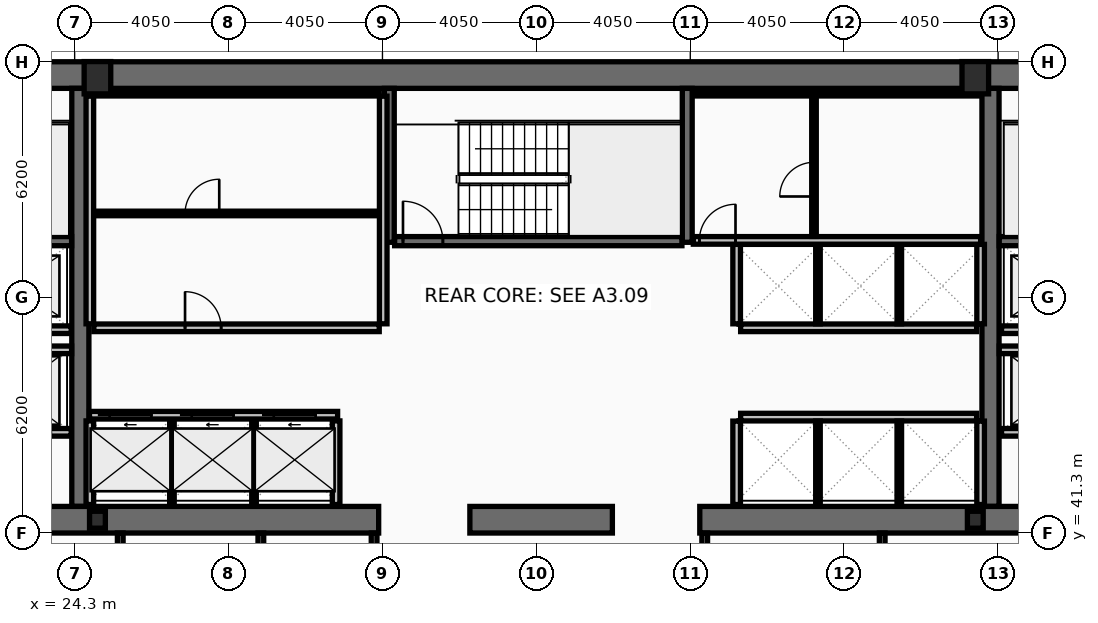
"""IFC4 building model, lengths in metres.
Left out: names, types, materials, properties, quantities, classifications, styles, units other than length and angle.
Written with IfcOpenShell. Run it as: python <this file> out.ifc"""

import sys

from ifc_helpers import new_model, si_unit, direction, frame, frame_2d, origin, origin_2d, place, context, subcontext, project, spatial, rectangle, hollow_rectangle, i_section, extrude, element, fill, save


model = new_model("IFC4")
c1 = context("Model", 3, precision=1e-05, world=origin(), true_north=direction((0.0, 1.0)))
c2 = subcontext(c1, "Body", "Model", "MODEL_VIEW")
j1 = project(units=[si_unit("LENGTHUNIT", "METRE"), si_unit("PLANEANGLEUNIT", "RADIAN")], contexts=[c1])
p1 = place(None, origin())
s1 = spatial("IfcSite", under=j1, at=p1, CompositionType="ELEMENT")
p2 = place(p1, origin())
s2 = spatial("IfcBuilding", under=s1, at=p2, CompositionType="ELEMENT")
p3 = place(p2, frame((0.0, 0.0, 118.2)))
s3 = spatial("IfcBuildingStorey", under=s2, at=p3, CompositionType="ELEMENT", Elevation=118.2)
p4 = place(p3, frame((16.2, 53.35, 0.0), z_axis=(0.0, 0.0, 1.0), x_axis=(1.0, 0.0, 0.0)))
e1 = element("IfcWall", 1, at=p4, inside=s3, PredefinedType="SHEAR", context=c2, shape_type="SweptSolid", body=[
    extrude(rectangle(XDim=40.5, YDim=0.7, at=frame_2d((20.25, 0.0))), origin(), (0.0, 0.0, 1.0), 3.44),
])
for number, where, z_axis, x_axis in (
    (2, (24.45, 42.0, 0.0), (0.0, 0.0, 1.0), (0.0, 1.0, 0.0)),
    (3, (48.4, 42.0, 0.0), (0.0, 0.0, 1.0), (0.0, 1.0, 0.0)),
):
    element("IfcWall", number, at=place(p3, frame(where, z_axis=z_axis, x_axis=x_axis)), inside=s3, PredefinedType="SHEAR", context=c2, shape_type="SweptSolid", body=[
        extrude(rectangle(XDim=11.0, YDim=0.45, at=frame_2d((5.5, 0.0))), origin(), (0.0, 0.0, 1.0), 3.44),
    ])
p5 = place(p3, frame((32.3, 41.65, 0.0), z_axis=(0.0, 0.0, 1.0), x_axis=(-1.0, 0.0, 0.0)))
e4 = element("IfcWall", 4, at=p5, inside=s3, PredefinedType="SHEAR", context=c2, shape_type="SweptSolid", body=[
    extrude(rectangle(XDim=11.45, YDim=0.7, at=frame_2d((5.725, 0.0))), origin(), (0.0, 0.0, 1.0), 3.44),
])
p6 = place(p3, frame((38.45, 41.65, 0.0), z_axis=(0.0, 0.0, 1.0), x_axis=(-1.0, 0.0, 0.0)))
e5 = element("IfcWall", 5, at=p6, inside=s3, PredefinedType="SHEAR", context=c2, shape_type="SweptSolid", body=[
    extrude(rectangle(XDim=3.75, YDim=0.7, at=frame_2d((1.875, 0.0))), origin(), (0.0, 0.0, 1.0), 3.44),
])
p7 = place(p3, frame((52.05, 41.65, 0.0), z_axis=(0.0, 0.0, 1.0), x_axis=(-1.0, 0.0, 0.0)))
e6 = element("IfcWall", 6, at=p7, inside=s3, PredefinedType="SHEAR", context=c2, shape_type="SweptSolid", body=[
    extrude(rectangle(XDim=11.3, YDim=0.7, at=frame_2d((5.65, 0.0))), origin(), (0.0, 0.0, 1.0), 3.44),
])
for number, where, z_axis, x_axis in (
    (7, (32.58, 48.95, 0.0), (0.0, 0.0, 1.0), (0.0, 1.0, 0.0)),
    (8, (40.42, 48.95, 0.0), (0.0, 0.0, 1.0), (0.0, 1.0, 0.0)),
):
    element("IfcWall", number, at=place(p3, frame(where, z_axis=z_axis, x_axis=x_axis)), inside=s3, PredefinedType="SHEAR", context=c2, shape_type="SweptSolid", body=[
        extrude(rectangle(XDim=4.05, YDim=0.26, at=frame_2d((2.025, 0.0))), origin(), (0.0, 0.0, 1.0), 3.44),
    ])
p8 = place(p3, frame((16.9, 48.98, 0.0), z_axis=(0.0, 0.0, 1.0), x_axis=(1.0, 0.0, 0.0)))
e9 = element("IfcWall", 9, at=p8, inside=s3, PredefinedType="SHEAR", context=c2, shape_type="SweptSolid", body=[
    extrude(rectangle(XDim=7.32, YDim=0.24, at=frame_2d((3.66, 0.0))), origin(), (0.0, 0.0, 1.0), 3.44),
])
p9 = place(p8, frame((0.22, 0.0, 0.0)))
e10 = element("IfcOpeningElement", 10, at=p9, cuts=e9, PredefinedType="OPENING", context=c2, shape_type="SweptSolid", body=[
    extrude(rectangle(XDim=1.05, YDim=2.15, at=frame_2d((0.525, 1.075))), frame((0.0, 0.13, 0.0), z_axis=(0.0, -1.0, 0.0), x_axis=(1.0, 0.0, 0.0)), (0.0, 0.0, 1.0), 0.26),
])
p10 = place(p3, frame((48.63, 48.98, 0.0), z_axis=(0.0, 0.0, 1.0), x_axis=(1.0, 0.0, 0.0)))
e11 = element("IfcWall", 11, at=p10, inside=s3, PredefinedType="SHEAR", context=c2, shape_type="SweptSolid", body=[
    extrude(rectangle(XDim=7.37, YDim=0.24, at=frame_2d((3.685, 0.0))), origin(), (0.0, 0.0, 1.0), 3.44),
])
p11 = place(p10, frame((6.1, 0.0, 0.0)))
e12 = element("IfcOpeningElement", 12, at=p11, cuts=e11, PredefinedType="OPENING", context=c2, shape_type="SweptSolid", body=[
    extrude(rectangle(XDim=1.05, YDim=2.15, at=frame_2d((0.525, 1.075))), frame((0.0, 0.13, 0.0), z_axis=(0.0, -1.0, 0.0), x_axis=(1.0, 0.0, 0.0)), (0.0, 0.0, 1.0), 0.26),
])
p12 = place(p3, frame((32.72, 48.98, 0.0), z_axis=(0.0, 0.0, 1.0), x_axis=(1.0, 0.0, 0.0)))
e13 = element("IfcWall", 13, at=p12, inside=s3, PredefinedType="SHEAR", context=c2, shape_type="SweptSolid", body=[
    extrude(rectangle(XDim=7.56, YDim=0.24, at=frame_2d((3.78, 0.0))), origin(), (0.0, 0.0, 1.0), 3.44),
])
p13 = place(p12, frame((0.22, 0.0, 0.0)))
e14 = element("IfcOpeningElement", 14, at=p13, cuts=e13, PredefinedType="OPENING", context=c2, shape_type="SweptSolid", body=[
    extrude(rectangle(XDim=1.05, YDim=2.15, at=frame_2d((0.525, 1.075))), frame((0.0, 0.13, 0.0), z_axis=(0.0, -1.0, 0.0), x_axis=(1.0, 0.0, 0.0)), (0.0, 0.0, 1.0), 0.26),
])
for number, where, z_axis, x_axis in (
    (15, (24.9, 53.28, 0.0), (0.0, 0.0, 1.0), (1.0, 0.0, 0.0)),
    (16, (48.0, 53.28, 0.0), (0.0, 0.0, 1.0), (1.0, 0.0, 0.0)),
):
    element("IfcColumn", number, at=place(p3, frame(where, z_axis=z_axis, x_axis=x_axis)), inside=s3, PredefinedType="COLUMN", context=c2, shape_type="SweptSolid", body=[
        extrude(hollow_rectangle(XDim=0.7, YDim=0.85, WallThickness=0.05, at=origin_2d()), origin(), (0.0, 0.0, 1.0), 3.6),
    ])
for number, where, z_axis, x_axis in (
    (17, (24.9, 41.65, 0.0), (0.0, 0.0, 1.0), (1.0, 0.0, 0.0)),
    (18, (48.0, 41.65, 0.0), (0.0, 0.0, 1.0), (1.0, 0.0, 0.0)),
):
    element("IfcColumn", number, at=place(p3, frame(where, z_axis=z_axis, x_axis=x_axis)), inside=s3, PredefinedType="COLUMN", context=c2, shape_type="SweptSolid", body=[
        extrude(i_section(OverallWidth=0.416, OverallDepth=0.446, WebThickness=0.039, FlangeThickness=0.063, at=origin_2d()), origin(), (0.0, 0.0, 1.0), 3.6),
    ])
p14 = place(p3, frame((24.69, 44.4, 0.0), z_axis=(0.0, 0.0, 1.0), x_axis=(1.0, 0.0, 0.0)))
e19 = element("IfcWall", 19, at=p14, inside=s3, PredefinedType="PARTITIONING", context=c2, shape_type="SweptSolid", body=[
    extrude(rectangle(XDim=6.53, YDim=0.2, at=frame_2d((3.265, 0.0))), origin(), (0.0, 0.0, 1.0), 3.44),
])
p15 = place(p14, frame((0.53, 0.0, 0.0)))
e20 = element("IfcOpeningElement", 20, at=p15, cuts=e19, PredefinedType="OPENING", context=c2, shape_type="SweptSolid", body=[
    extrude(rectangle(XDim=1.1, YDim=2.18, at=frame_2d((0.55, 1.09))), frame((0.0, 0.11, 0.0), z_axis=(0.0, -1.0, 0.0), x_axis=(1.0, 0.0, 0.0)), (0.0, 0.0, 1.0), 0.22),
])
p16 = place(p14, frame((2.69, 0.0, 0.0)))
e21 = element("IfcOpeningElement", 21, at=p16, cuts=e19, PredefinedType="OPENING", context=c2, shape_type="SweptSolid", body=[
    extrude(rectangle(XDim=1.1, YDim=2.18, at=frame_2d((0.55, 1.09))), frame((0.0, 0.11, 0.0), z_axis=(0.0, -1.0, 0.0), x_axis=(1.0, 0.0, 0.0)), (0.0, 0.0, 1.0), 0.22),
])
p17 = place(p14, frame((4.85, 0.0, 0.0)))
e22 = element("IfcOpeningElement", 22, at=p17, cuts=e19, PredefinedType="OPENING", context=c2, shape_type="SweptSolid", body=[
    extrude(rectangle(XDim=1.1, YDim=2.18, at=frame_2d((0.55, 1.09))), frame((0.0, 0.11, 0.0), z_axis=(0.0, -1.0, 0.0), x_axis=(1.0, 0.0, 0.0)), (0.0, 0.0, 1.0), 0.22),
])
p18 = place(p3, frame((51.61, 43.95, 0.0), z_axis=(0.0, 0.0, 1.0), x_axis=(-1.0, 0.0, 0.0)))
e23 = element("IfcWall", 23, at=p18, inside=s3, PredefinedType="PARTITIONING", context=c2, shape_type="SweptSolid", body=[
    extrude(rectangle(XDim=2.92, YDim=0.2, at=frame_2d((1.46, 0.0))), origin(), (0.0, 0.0, 1.0), 3.44),
])
p19 = place(p18, frame((0.81, 0.0, 0.0)))
e24 = element("IfcOpeningElement", 24, at=p19, cuts=e23, PredefinedType="OPENING", context=c2, shape_type="SweptSolid", body=[
    extrude(rectangle(XDim=1.3, YDim=2.18, at=frame_2d((0.65, 1.09))), frame((0.0, 0.11, 0.0), z_axis=(0.0, -1.0, 0.0), x_axis=(1.0, 0.0, 0.0)), (0.0, 0.0, 1.0), 0.22),
])
p20 = place(p3, frame((24.21, 43.95, 0.0), z_axis=(0.0, 0.0, 1.0), x_axis=(-1.0, 0.0, 0.0)))
e25 = element("IfcWall", 25, at=p20, inside=s3, PredefinedType="PARTITIONING", context=c2, shape_type="SweptSolid", body=[
    extrude(rectangle(XDim=2.97, YDim=0.2, at=frame_2d((1.485, 0.0))), origin(), (0.0, 0.0, 1.0), 3.44),
])
p21 = place(p20, frame((0.86, 0.0, 0.0)))
e26 = element("IfcOpeningElement", 26, at=p21, cuts=e25, PredefinedType="OPENING", context=c2, shape_type="SweptSolid", body=[
    extrude(rectangle(XDim=1.3, YDim=2.18, at=frame_2d((0.65, 1.09))), frame((0.0, 0.11, 0.0), z_axis=(0.0, -1.0, 0.0), x_axis=(1.0, 0.0, 0.0)), (0.0, 0.0, 1.0), 0.22),
])
p22 = place(p3, frame((51.61, 46.65, 0.0), z_axis=(0.0, 0.0, 1.0), x_axis=(-1.0, 0.0, 0.0)))
e27 = element("IfcWall", 27, at=p22, inside=s3, PredefinedType="PARTITIONING", context=c2, shape_type="SweptSolid", body=[
    extrude(rectangle(XDim=2.92, YDim=0.2, at=frame_2d((1.46, 0.0))), origin(), (0.0, 0.0, 1.0), 3.44),
])
p23 = place(p22, frame((0.86, 0.0, 0.0)))
e28 = element("IfcOpeningElement", 28, at=p23, cuts=e27, PredefinedType="OPENING", context=c2, shape_type="SweptSolid", body=[
    extrude(rectangle(XDim=1.2, YDim=2.18, at=frame_2d((0.6, 1.09))), frame((0.0, 0.11, 0.0), z_axis=(0.0, -1.0, 0.0), x_axis=(1.0, 0.0, 0.0)), (0.0, 0.0, 1.0), 0.22),
])
p24 = place(p3, frame((24.21, 46.65, 0.0), z_axis=(0.0, 0.0, 1.0), x_axis=(-1.0, 0.0, 0.0)))
e29 = element("IfcWall", 29, at=p24, inside=s3, PredefinedType="PARTITIONING", context=c2, shape_type="SweptSolid", body=[
    extrude(rectangle(XDim=2.97, YDim=0.2, at=frame_2d((1.485, 0.0))), origin(), (0.0, 0.0, 1.0), 3.44),
])
p25 = place(p24, frame((0.91, 0.0, 0.0)))
e30 = element("IfcOpeningElement", 30, at=p25, cuts=e29, PredefinedType="OPENING", context=c2, shape_type="SweptSolid", body=[
    extrude(rectangle(XDim=1.2, YDim=2.18, at=frame_2d((0.6, 1.09))), frame((0.0, 0.11, 0.0), z_axis=(0.0, -1.0, 0.0), x_axis=(1.0, 0.0, 0.0)), (0.0, 0.0, 1.0), 0.22),
])
p26 = place(p3, frame((21.2, 46.12, 0.0), z_axis=(0.0, 0.0, 1.0), x_axis=(1.0, 0.0, 0.0)))
e31 = element("IfcWall", 31, at=p26, inside=s3, PredefinedType="PARTITIONING", context=c2, shape_type="SweptSolid", body=[
    extrude(rectangle(XDim=3.02, YDim=0.2, at=frame_2d((1.51, 0.0))), origin(), (0.0, 0.0, 1.0), 3.44),
])
p27 = place(p3, frame((48.63, 46.12, 0.0), z_axis=(0.0, 0.0, 1.0), x_axis=(1.0, 0.0, 0.0)))
e32 = element("IfcWall", 32, at=p27, inside=s3, PredefinedType="PARTITIONING", context=c2, shape_type="SweptSolid", body=[
    extrude(rectangle(XDim=3.07, YDim=0.2, at=frame_2d((1.535, 0.0))), origin(), (0.0, 0.0, 1.0), 3.44),
])
for number, where, z_axis, x_axis in (
    (33, (24.7, 46.805, 0.0), (0.0, 0.0, 1.0), (0.0, 1.0, 0.0)),
    (34, (32.42, 46.805, 0.0), (0.0, 0.0, 1.0), (0.0, 1.0, 0.0)),
):
    element("IfcWall", number, at=place(p3, frame(where, z_axis=z_axis, x_axis=x_axis)), inside=s3, PredefinedType="PARTITIONING", context=c2, shape_type="SweptSolid", body=[
        extrude(rectangle(XDim=5.99, YDim=0.2, at=frame_2d((2.995, 0.0))), origin(), (0.0, 0.0, 1.0), 3.44),
    ])
p28 = place(p3, frame((24.805, 52.86, 0.0), z_axis=(0.0, 0.0, 1.0), x_axis=(1.0, 0.0, 0.0)))
e35 = element("IfcWall", 35, at=p28, inside=s3, PredefinedType="PARTITIONING", context=c2, shape_type="SweptSolid", body=[
    extrude(rectangle(XDim=7.51, YDim=0.12, at=frame_2d((3.755, 0.0))), origin(), (0.0, 0.0, 1.0), 3.44),
])
p29 = place(p3, frame((24.805, 49.709, 0.0), z_axis=(0.0, 0.0, 1.0), x_axis=(1.0, 0.0, 0.0)))
e36 = element("IfcWall", 36, at=p29, inside=s3, PredefinedType="PARTITIONING", context=c2, shape_type="SweptSolid", body=[
    extrude(rectangle(XDim=7.51, YDim=0.12, at=frame_2d((3.755, 0.0))), origin(), (0.0, 0.0, 1.0), 3.44),
])
p30 = place(p29, frame((2.4, 0.0, 0.0)))
e37 = element("IfcOpeningElement", 37, at=p30, cuts=e36, PredefinedType="OPENING", context=c2, shape_type="SweptSolid", body=[
    extrude(rectangle(XDim=0.9, YDim=2.05, at=frame_2d((0.45, 1.025))), frame((0.0, 0.07, 0.0), z_axis=(0.0, -1.0, 0.0), x_axis=(1.0, 0.0, 0.0)), (0.0, 0.0, 1.0), 0.14),
])
p31 = place(p3, frame((24.805, 46.7, 0.0), z_axis=(0.0, 0.0, 1.0), x_axis=(1.0, 0.0, 0.0)))
e38 = element("IfcWall", 38, at=p31, inside=s3, PredefinedType="PARTITIONING", context=c2, shape_type="SweptSolid", body=[
    extrude(rectangle(XDim=7.51, YDim=0.2, at=frame_2d((3.755, 0.0))), origin(), (0.0, 0.0, 1.0), 3.44),
])
p32 = place(p31, frame((2.4, 0.0, 0.0)))
e39 = element("IfcOpeningElement", 39, at=p32, cuts=e38, PredefinedType="OPENING", context=c2, shape_type="SweptSolid", body=[
    extrude(rectangle(XDim=0.95, YDim=2.1, at=frame_2d((0.475, 1.05))), frame((0.0, 0.11, 0.0), z_axis=(0.0, -1.0, 0.0), x_axis=(1.0, 0.0, 0.0)), (0.0, 0.0, 1.0), 0.22),
])
for number, where, z_axis, x_axis in (
    (40, (24.7, 42.05, 0.0), (0.0, 0.0, 1.0), (0.0, 1.0, 0.0)),
    (41, (31.18, 42.05, 0.0), (0.0, 0.0, 1.0), (0.0, 1.0, 0.0)),
):
    element("IfcWall", number, at=place(p3, frame(where, z_axis=z_axis, x_axis=x_axis)), inside=s3, PredefinedType="PARTITIONING", context=c2, shape_type="SweptSolid", body=[
        extrude(rectangle(XDim=2.2, YDim=0.2, at=frame_2d((1.1, 0.0))), origin(), (0.0, 0.0, 1.0), 3.44),
    ])
for number, where, z_axis, x_axis in (
    (42, (26.86, 42.05, 0.0), (0.0, 0.0, 1.0), (0.0, 1.0, 0.0)),
    (43, (29.02, 42.05, 0.0), (0.0, 0.0, 1.0), (0.0, 1.0, 0.0)),
):
    element("IfcWall", number, at=place(p3, frame(where, z_axis=z_axis, x_axis=x_axis)), inside=s3, PredefinedType="PARTITIONING", context=c2, shape_type="SweptSolid", body=[
        extrude(rectangle(XDim=2.2, YDim=0.12, at=frame_2d((1.1, 0.0))), origin(), (0.0, 0.0, 1.0), 3.44),
    ])
p33 = place(p3, frame((41.825, 46.7, 0.0), z_axis=(0.0, 0.0, 1.0), x_axis=(1.0, 0.0, 0.0)))
e44 = element("IfcWall", 44, at=p33, inside=s3, PredefinedType="PARTITIONING", context=c2, shape_type="SweptSolid", body=[
    extrude(rectangle(XDim=6.21, YDim=0.2, at=frame_2d((3.105, 0.0))), origin(), (0.0, 0.0, 1.0), 3.44),
])
for number, where, z_axis, x_axis in (
    (45, (41.72, 46.805, 0.0), (0.0, 0.0, 1.0), (0.0, 1.0, 0.0)),
    (46, (48.14, 46.805, 0.0), (0.0, 0.0, 1.0), (0.0, 1.0, 0.0)),
):
    element("IfcWall", number, at=place(p3, frame(where, z_axis=z_axis, x_axis=x_axis)), inside=s3, PredefinedType="PARTITIONING", context=c2, shape_type="SweptSolid", body=[
        extrude(rectangle(XDim=2.09, YDim=0.2, at=frame_2d((1.045, 0.0))), origin(), (0.0, 0.0, 1.0), 3.44),
    ])
for number, where, z_axis, x_axis in (
    (47, (43.86, 46.805, 0.0), (0.0, 0.0, 1.0), (0.0, 1.0, 0.0)),
    (48, (46.0, 46.805, 0.0), (0.0, 0.0, 1.0), (0.0, 1.0, 0.0)),
):
    element("IfcWall", number, at=place(p3, frame(where, z_axis=z_axis, x_axis=x_axis)), inside=s3, PredefinedType="PARTITIONING", context=c2, shape_type="SweptSolid", body=[
        extrude(rectangle(XDim=2.09, YDim=0.12, at=frame_2d((1.045, 0.0))), origin(), (0.0, 0.0, 1.0), 3.44),
    ])
p34 = place(p3, frame((41.825, 44.35, 0.0), z_axis=(0.0, 0.0, 1.0), x_axis=(1.0, 0.0, 0.0)))
e49 = element("IfcWall", 49, at=p34, inside=s3, PredefinedType="PARTITIONING", context=c2, shape_type="SweptSolid", body=[
    extrude(rectangle(XDim=6.21, YDim=0.2, at=frame_2d((3.105, 0.0))), origin(), (0.0, 0.0, 1.0), 3.44),
])
for number, where, z_axis, x_axis in (
    (50, (41.72, 42.05, 0.0), (0.0, 0.0, 1.0), (0.0, 1.0, 0.0)),
    (51, (48.14, 42.05, 0.0), (0.0, 0.0, 1.0), (0.0, 1.0, 0.0)),
):
    element("IfcWall", number, at=place(p3, frame(where, z_axis=z_axis, x_axis=x_axis)), inside=s3, PredefinedType="PARTITIONING", context=c2, shape_type="SweptSolid", body=[
        extrude(rectangle(XDim=2.195, YDim=0.2, at=frame_2d((1.098, 0.0))), origin(), (0.0, 0.0, 1.0), 3.44),
    ])
for number, where, z_axis, x_axis in (
    (52, (43.86, 42.05, 0.0), (0.0, 0.0, 1.0), (0.0, 1.0, 0.0)),
    (53, (46.0, 42.05, 0.0), (0.0, 0.0, 1.0), (0.0, 1.0, 0.0)),
):
    element("IfcWall", number, at=place(p3, frame(where, z_axis=z_axis, x_axis=x_axis)), inside=s3, PredefinedType="PARTITIONING", context=c2, shape_type="SweptSolid", body=[
        extrude(rectangle(XDim=2.195, YDim=0.12, at=frame_2d((1.098, 0.0))), origin(), (0.0, 0.0, 1.0), 3.44),
    ])
p35 = place(p3, frame((40.58, 52.86, 0.0), z_axis=(0.0, 0.0, 1.0), x_axis=(1.0, 0.0, 0.0)))
e54 = element("IfcWall", 54, at=p35, inside=s3, PredefinedType="PARTITIONING", context=c2, shape_type="SweptSolid", body=[
    extrude(rectangle(XDim=7.56, YDim=0.12, at=frame_2d((3.78, 0.0))), origin(), (0.0, 0.0, 1.0), 3.44),
])
p36 = place(p3, frame((40.58, 49.0, 0.0), z_axis=(0.0, 0.0, 1.0), x_axis=(1.0, 0.0, 0.0)))
e55 = element("IfcWall", 55, at=p36, inside=s3, PredefinedType="PARTITIONING", context=c2, shape_type="SweptSolid", body=[
    extrude(rectangle(XDim=7.56, YDim=0.2, at=frame_2d((3.78, 0.0))), origin(), (0.0, 0.0, 1.0), 3.44),
])
p37 = place(p36, frame((0.16, 0.0, 0.0)))
e56 = element("IfcOpeningElement", 56, at=p37, cuts=e55, PredefinedType="OPENING", context=c2, shape_type="SweptSolid", body=[
    extrude(rectangle(XDim=0.95, YDim=2.1, at=frame_2d((0.475, 1.05))), frame((0.0, 0.11, 0.0), z_axis=(0.0, -1.0, 0.0), x_axis=(1.0, 0.0, 0.0)), (0.0, 0.0, 1.0), 0.22),
])
p38 = place(p3, frame((43.755, 49.105, 0.0), z_axis=(0.0, 0.0, 1.0), x_axis=(0.0, 1.0, 0.0)))
e57 = element("IfcWall", 57, at=p38, inside=s3, PredefinedType="PARTITIONING", context=c2, shape_type="SweptSolid", body=[
    extrude(rectangle(XDim=3.69, YDim=0.12, at=frame_2d((1.845, 0.0))), origin(), (0.0, 0.0, 1.0), 3.44),
])
p39 = place(p38, frame((1.05, 0.0, 0.0)))
e58 = element("IfcOpeningElement", 58, at=p39, cuts=e57, PredefinedType="OPENING", context=c2, shape_type="SweptSolid", body=[
    extrude(rectangle(XDim=0.9, YDim=2.05, at=frame_2d((0.45, 1.025))), frame((0.0, 0.07, 0.0), z_axis=(0.0, -1.0, 0.0), x_axis=(1.0, 0.0, 0.0)), (0.0, 0.0, 1.0), 0.14),
])
for number, where, z_axis, x_axis in (
    (59, (25.5, 38.28, 0.0), (0.0, 0.0, 1.0), (0.0, 1.0, 0.0)),
    (60, (29.2, 38.28, 0.0), (0.0, 0.0, 1.0), (0.0, 1.0, 0.0)),
    (61, (32.18, 38.28, 0.0), (0.0, 0.0, 1.0), (0.0, 1.0, 0.0)),
    (62, (40.88, 38.28, 0.0), (0.0, 0.0, 1.0), (0.0, 1.0, 0.0)),
    (63, (45.55, 38.28, 0.0), (0.0, 0.0, 1.0), (0.0, 1.0, 0.0)),
):
    element("IfcWall", number, at=place(p3, frame(where, z_axis=z_axis, x_axis=x_axis)), inside=s3, PredefinedType="PARTITIONING", context=c2, shape_type="SweptSolid", body=[
        extrude(rectangle(XDim=3.02, YDim=0.15, at=frame_2d((1.51, 0.0))), origin(), (0.0, 0.0, 1.0), 3.44),
    ])
p40 = place(p13, origin())
e64 = element("IfcDoor", 64, at=p40, inside=s3, OperationType="SINGLE_SWING_LEFT", PredefinedType="DOOR", context=c2, shape_type="SweptSolid", body=[
    extrude(rectangle(XDim=1.05, YDim=2.15, at=frame_2d((0.525, 1.075))), frame((0.0, 0.025, 0.0), z_axis=(0.0, -1.0, 0.0), x_axis=(1.0, 0.0, 0.0)), (0.0, 0.0, 1.0), 0.05),
])
fill(e14, e64)
p41 = place(p15, origin())
e65 = element("IfcDoor", 65, at=p41, inside=s3, OperationType="SLIDING_TO_LEFT", PredefinedType="DOOR", context=c2, shape_type="SweptSolid", body=[
    extrude(rectangle(XDim=1.1, YDim=2.18, at=frame_2d((0.55, 1.09))), frame((0.0, 0.025, 0.0), z_axis=(0.0, -1.0, 0.0), x_axis=(1.0, 0.0, 0.0)), (0.0, 0.0, 1.0), 0.05),
])
fill(e20, e65)
p42 = place(p16, origin())
e66 = element("IfcDoor", 66, at=p42, inside=s3, OperationType="SLIDING_TO_LEFT", PredefinedType="DOOR", context=c2, shape_type="SweptSolid", body=[
    extrude(rectangle(XDim=1.1, YDim=2.18, at=frame_2d((0.55, 1.09))), frame((0.0, 0.025, 0.0), z_axis=(0.0, -1.0, 0.0), x_axis=(1.0, 0.0, 0.0)), (0.0, 0.0, 1.0), 0.05),
])
fill(e21, e66)
p43 = place(p17, origin())
e67 = element("IfcDoor", 67, at=p43, inside=s3, OperationType="SLIDING_TO_LEFT", PredefinedType="DOOR", context=c2, shape_type="SweptSolid", body=[
    extrude(rectangle(XDim=1.1, YDim=2.18, at=frame_2d((0.55, 1.09))), frame((0.0, 0.025, 0.0), z_axis=(0.0, -1.0, 0.0), x_axis=(1.0, 0.0, 0.0)), (0.0, 0.0, 1.0), 0.05),
])
fill(e22, e67)
p44 = place(p30, origin())
e68 = element("IfcDoor", 68, at=p44, inside=s3, OperationType="SINGLE_SWING_RIGHT", PredefinedType="DOOR", context=c2, shape_type="SweptSolid", body=[
    extrude(rectangle(XDim=0.9, YDim=2.05, at=frame_2d((0.45, 1.025))), frame((0.0, 0.025, 0.0), z_axis=(0.0, -1.0, 0.0), x_axis=(1.0, 0.0, 0.0)), (0.0, 0.0, 1.0), 0.05),
])
fill(e37, e68)
p45 = place(p32, origin())
e69 = element("IfcDoor", 69, at=p45, inside=s3, OperationType="SINGLE_SWING_LEFT", PredefinedType="DOOR", context=c2, shape_type="SweptSolid", body=[
    extrude(rectangle(XDim=0.95, YDim=2.1, at=frame_2d((0.475, 1.05))), frame((0.0, 0.025, 0.0), z_axis=(0.0, -1.0, 0.0), x_axis=(1.0, 0.0, 0.0)), (0.0, 0.0, 1.0), 0.05),
])
fill(e39, e69)
p46 = place(p37, origin())
e70 = element("IfcDoor", 70, at=p46, inside=s3, OperationType="SINGLE_SWING_RIGHT", PredefinedType="DOOR", context=c2, shape_type="SweptSolid", body=[
    extrude(rectangle(XDim=0.95, YDim=2.1, at=frame_2d((0.475, 1.05))), frame((0.0, 0.025, 0.0), z_axis=(0.0, -1.0, 0.0), x_axis=(1.0, 0.0, 0.0)), (0.0, 0.0, 1.0), 0.05),
])
fill(e56, e70)
p47 = place(p39, origin())
e71 = element("IfcDoor", 71, at=p47, inside=s3, OperationType="SINGLE_SWING_LEFT", PredefinedType="DOOR", context=c2, shape_type="SweptSolid", body=[
    extrude(rectangle(XDim=0.9, YDim=2.05, at=frame_2d((0.45, 1.025))), frame((0.0, 0.025, 0.0), z_axis=(0.0, -1.0, 0.0), x_axis=(1.0, 0.0, 0.0)), (0.0, 0.0, 1.0), 0.05),
])
fill(e58, e71)
save(model, sys.argv[1])
